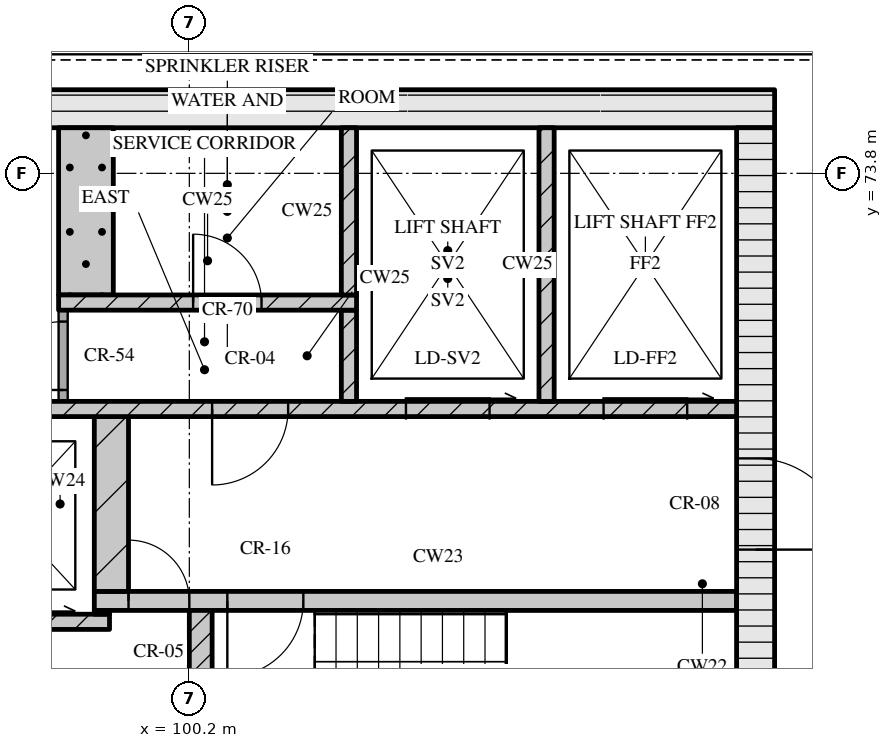
"""IFC4 building model, lengths in metres.
Left out: names, types, materials, properties, quantities, classifications, styles, units other than length and angle.
Written with IfcOpenShell. Run it as: python <this file> out.ifc"""

import sys

from ifc_helpers import new_model, si_unit, direction, frame, frame_2d, origin, place, context, subcontext, project, spatial, rectangle, extrude, element, fill, save


model = new_model("IFC4")
c1 = context("Model", 3, precision=1e-05, world=origin(), true_north=direction((0.0, 1.0)))
c2 = subcontext(c1, "Body", "Model", "MODEL_VIEW")
j1 = project(units=[si_unit("LENGTHUNIT", "METRE"), si_unit("PLANEANGLEUNIT", "RADIAN")], contexts=[c1])
p1 = place(None, origin())
s1 = spatial("IfcSite", under=j1, at=p1, CompositionType="ELEMENT")
p2 = place(p1, origin())
s2 = spatial("IfcBuilding", under=s1, at=p2, CompositionType="ELEMENT")
p3 = place(p2, frame((0.0, 0.0, 285.15)))
s3 = spatial("IfcBuildingStorey", under=s2, at=p3, CompositionType="ELEMENT", Elevation=285.15)
p4 = place(p3, frame((67.3, 74.65, 0.0), z_axis=(0.0, 0.0, 1.0), x_axis=(1.0, 0.0, 0.0)))
e1 = element("IfcWall", 1, at=p4, inside=s3, PredefinedType="SOLIDWALL", context=c2, shape_type="SweptSolid", body=[
    extrude(rectangle(XDim=40.6, YDim=0.5, at=frame_2d((20.3, 0.0))), origin(), (0.0, 0.0, 1.0), 3.32),
])
p5 = place(p3, frame((107.65, 62.4, 0.0), z_axis=(0.0, 0.0, 1.0), x_axis=(0.0, 1.0, 0.0)))
e2 = element("IfcWall", 2, at=p5, inside=s3, PredefinedType="SOLIDWALL", context=c2, shape_type="SweptSolid", body=[
    extrude(rectangle(XDim=12.0, YDim=0.5, at=frame_2d((6.0, 0.0))), origin(), (0.0, 0.0, 1.0), 3.32),
])
p6 = place(p5, frame((6.45, 0.0, 0.0)))
e3 = element("IfcOpeningElement", 3, at=p6, cuts=e2, PredefinedType="OPENING", context=c2, shape_type="SweptSolid", body=[
    extrude(rectangle(XDim=1.2, YDim=2.1, at=frame_2d((0.6, 1.05))), frame((0.0, 0.26, 0.0), z_axis=(0.0, -1.0, 0.0), x_axis=(1.0, 0.0, 0.0)), (0.0, 0.0, 1.0), 0.52),
])
p7 = place(p3, frame((100.35, 65.2, 0.0), z_axis=(0.0, 0.0, 1.0), x_axis=(0.0, 1.0, 0.0)))
e4 = element("IfcWall", 4, at=p7, inside=s3, PredefinedType="SOLIDWALL", context=c2, shape_type="SweptSolid", body=[
    extrude(rectangle(XDim=2.85, YDim=0.3, at=frame_2d((1.425, 0.0))), origin(), (0.0, 0.0, 1.0), 3.32),
])
p8 = place(p3, frame((76.05, 67.9, 0.0), z_axis=(0.0, 0.0, 1.0), x_axis=(1.0, 0.0, 0.0)))
e5 = element("IfcWall", 5, at=p8, inside=s3, PredefinedType="SOLIDWALL", context=c2, shape_type="SweptSolid", body=[
    extrude(rectangle(XDim=23.1, YDim=0.2, at=frame_2d((11.55, 0.0))), origin(), (0.0, 0.0, 1.0), 3.32),
])
p9 = place(p8, frame((0.75, 0.0, 0.0)))
e6 = element("IfcOpeningElement", 6, at=p9, cuts=e5, PredefinedType="OPENING", context=c2, shape_type="SweptSolid", body=[
    extrude(rectangle(XDim=0.9, YDim=2.1, at=frame_2d((0.45, 1.05))), frame((0.0, 0.11, 0.0), z_axis=(0.0, -1.0, 0.0), x_axis=(1.0, 0.0, 0.0)), (0.0, 0.0, 1.0), 0.22),
])
p10 = place(p8, frame((3.32, 0.0, 0.0)))
e7 = element("IfcOpeningElement", 7, at=p10, cuts=e5, PredefinedType="OPENING", context=c2, shape_type="SweptSolid", body=[
    extrude(rectangle(XDim=0.9, YDim=2.1, at=frame_2d((0.45, 1.05))), frame((0.0, 0.11, 0.0), z_axis=(0.0, -1.0, 0.0), x_axis=(1.0, 0.0, 0.0)), (0.0, 0.0, 1.0), 0.22),
])
p11 = place(p8, frame((5.77, 0.0, 0.0)))
e8 = element("IfcOpeningElement", 8, at=p11, cuts=e5, PredefinedType="OPENING", context=c2, shape_type="SweptSolid", body=[
    extrude(rectangle(XDim=0.9, YDim=2.1, at=frame_2d((0.45, 1.05))), frame((0.0, 0.11, 0.0), z_axis=(0.0, -1.0, 0.0), x_axis=(1.0, 0.0, 0.0)), (0.0, 0.0, 1.0), 0.22),
])
p12 = place(p8, frame((8.45, 0.0, 0.0)))
e9 = element("IfcOpeningElement", 9, at=p12, cuts=e5, PredefinedType="OPENING", context=c2, shape_type="SweptSolid", body=[
    extrude(rectangle(XDim=0.9, YDim=2.1, at=frame_2d((0.45, 1.05))), frame((0.0, 0.11, 0.0), z_axis=(0.0, -1.0, 0.0), x_axis=(1.0, 0.0, 0.0)), (0.0, 0.0, 1.0), 0.22),
])
p13 = place(p8, frame((10.91, 0.0, 0.0)))
e10 = element("IfcOpeningElement", 10, at=p13, cuts=e5, PredefinedType="OPENING", context=c2, shape_type="SweptSolid", body=[
    extrude(rectangle(XDim=0.9, YDim=2.1, at=frame_2d((0.45, 1.05))), frame((0.0, 0.11, 0.0), z_axis=(0.0, -1.0, 0.0), x_axis=(1.0, 0.0, 0.0)), (0.0, 0.0, 1.0), 0.22),
])
p14 = place(p8, frame((13.55, 0.0, 0.0)))
e11 = element("IfcOpeningElement", 11, at=p14, cuts=e5, PredefinedType="OPENING", context=c2, shape_type="SweptSolid", body=[
    extrude(rectangle(XDim=1.0, YDim=2.1, at=frame_2d((0.5, 1.05))), frame((0.0, 0.11, 0.0), z_axis=(0.0, -1.0, 0.0), x_axis=(1.0, 0.0, 0.0)), (0.0, 0.0, 1.0), 0.22),
])
p15 = place(p8, frame((16.2, 0.0, 0.0)))
e12 = element("IfcOpeningElement", 12, at=p15, cuts=e5, PredefinedType="OPENING", context=c2, shape_type="SweptSolid", body=[
    extrude(rectangle(XDim=1.1, YDim=2.1, at=frame_2d((0.55, 1.05))), frame((0.0, 0.11, 0.0), z_axis=(0.0, -1.0, 0.0), x_axis=(1.0, 0.0, 0.0)), (0.0, 0.0, 1.0), 0.22),
])
p16 = place(p8, frame((18.7, 0.0, 0.0)))
e13 = element("IfcOpeningElement", 13, at=p16, cuts=e5, PredefinedType="OPENING", context=c2, shape_type="SweptSolid", body=[
    extrude(rectangle(XDim=1.1, YDim=2.1, at=frame_2d((0.55, 1.05))), frame((0.0, 0.11, 0.0), z_axis=(0.0, -1.0, 0.0), x_axis=(1.0, 0.0, 0.0)), (0.0, 0.0, 1.0), 0.22),
])
p17 = place(p8, frame((21.2, 0.0, 0.0)))
e14 = element("IfcOpeningElement", 14, at=p17, cuts=e5, PredefinedType="OPENING", context=c2, shape_type="SweptSolid", body=[
    extrude(rectangle(XDim=1.1, YDim=2.1, at=frame_2d((0.55, 1.05))), frame((0.0, 0.11, 0.0), z_axis=(0.0, -1.0, 0.0), x_axis=(1.0, 0.0, 0.0)), (0.0, 0.0, 1.0), 0.22),
])
p18 = place(p3, frame((98.95, 68.025, 0.0), z_axis=(0.0, 0.0, 1.0), x_axis=(1.0, 0.0, 0.0)))
e15 = element("IfcWall", 15, at=p18, inside=s3, PredefinedType="SOLIDWALL", context=c2, shape_type="SweptSolid", body=[
    extrude(rectangle(XDim=0.2, YDim=0.05, at=frame_2d((0.1, 0.0))), origin(), (0.0, 0.0, 1.0), 3.32),
])
p19 = place(p3, frame((98.95, 68.175, 0.0), z_axis=(0.0, 0.0, 1.0), x_axis=(1.0, 0.0, 0.0)))
e16 = element("IfcWall", 16, at=p19, inside=s3, PredefinedType="SOLIDWALL", context=c2, shape_type="SweptSolid", body=[
    extrude(rectangle(XDim=8.45, YDim=0.25, at=frame_2d((4.225, 0.0))), origin(), (0.0, 0.0, 1.0), 3.32),
])
p20 = place(p19, frame((0.45, 0.0, 0.0)))
e17 = element("IfcOpeningElement", 17, at=p20, cuts=e16, PredefinedType="OPENING", context=c2, shape_type="SweptSolid", body=[
    extrude(rectangle(XDim=0.8, YDim=2.1, at=frame_2d((0.4, 1.05))), frame((0.0, 0.135, 0.0), z_axis=(0.0, -1.0, 0.0), x_axis=(1.0, 0.0, 0.0)), (0.0, 0.0, 1.0), 0.27),
])
p21 = place(p19, frame((1.75, 0.0, 0.0)))
e18 = element("IfcOpeningElement", 18, at=p21, cuts=e16, PredefinedType="OPENING", context=c2, shape_type="SweptSolid", body=[
    extrude(rectangle(XDim=1.0, YDim=2.1, at=frame_2d((0.5, 1.05))), frame((0.0, 0.135, 0.0), z_axis=(0.0, -1.0, 0.0), x_axis=(1.0, 0.0, 0.0)), (0.0, 0.0, 1.0), 0.27),
])
p22 = place(p3, frame((99.175, 68.3, 0.0), z_axis=(0.0, 0.0, 1.0), x_axis=(0.0, 1.0, 0.0)))
e19 = element("IfcWall", 19, at=p22, inside=s3, PredefinedType="SOLIDWALL", context=c2, shape_type="SweptSolid", body=[
    extrude(rectangle(XDim=2.3, YDim=0.45, at=frame_2d((1.15, 0.0))), origin(), (0.0, 0.0, 1.0), 3.32),
])
p23 = place(p3, frame((67.8, 70.7, 0.0), z_axis=(0.0, 0.0, 1.0), x_axis=(1.0, 0.0, 0.0)))
e20 = element("IfcWall", 20, at=p23, inside=s3, PredefinedType="SOLIDWALL", context=c2, shape_type="SweptSolid", body=[
    extrude(rectangle(XDim=39.6, YDim=0.2, at=frame_2d((19.8, 0.0))), origin(), (0.0, 0.0, 1.0), 3.32),
])
p24 = place(p23, frame((0.65, 0.0, 0.0)))
e21 = element("IfcOpeningElement", 21, at=p24, cuts=e20, PredefinedType="OPENING", context=c2, shape_type="SweptSolid", body=[
    extrude(rectangle(XDim=1.1, YDim=2.1, at=frame_2d((0.55, 1.05))), frame((0.0, 0.11, 0.0), z_axis=(0.0, -1.0, 0.0), x_axis=(1.0, 0.0, 0.0)), (0.0, 0.0, 1.0), 0.22),
])
p25 = place(p23, frame((3.25, 0.0, 0.0)))
e22 = element("IfcOpeningElement", 22, at=p25, cuts=e20, PredefinedType="OPENING", context=c2, shape_type="SweptSolid", body=[
    extrude(rectangle(XDim=1.1, YDim=2.1, at=frame_2d((0.55, 1.05))), frame((0.0, 0.11, 0.0), z_axis=(0.0, -1.0, 0.0), x_axis=(1.0, 0.0, 0.0)), (0.0, 0.0, 1.0), 0.22),
])
p26 = place(p23, frame((5.9, 0.0, 0.0)))
e23 = element("IfcOpeningElement", 23, at=p26, cuts=e20, PredefinedType="OPENING", context=c2, shape_type="SweptSolid", body=[
    extrude(rectangle(XDim=1.0, YDim=2.1, at=frame_2d((0.5, 1.05))), frame((0.0, 0.11, 0.0), z_axis=(0.0, -1.0, 0.0), x_axis=(1.0, 0.0, 0.0)), (0.0, 0.0, 1.0), 0.22),
])
p27 = place(p23, frame((21.7, 0.0, 0.0)))
e24 = element("IfcOpeningElement", 24, at=p27, cuts=e20, PredefinedType="OPENING", context=c2, shape_type="SweptSolid", body=[
    extrude(rectangle(XDim=1.0, YDim=2.1, at=frame_2d((0.5, 1.05))), frame((0.0, 0.11, 0.0), z_axis=(0.0, -1.0, 0.0), x_axis=(1.0, 0.0, 0.0)), (0.0, 0.0, 1.0), 0.22),
])
p28 = place(p23, frame((32.7, 0.0, 0.0)))
e25 = element("IfcOpeningElement", 25, at=p28, cuts=e20, PredefinedType="OPENING", context=c2, shape_type="SweptSolid", body=[
    extrude(rectangle(XDim=1.0, YDim=2.1, at=frame_2d((0.5, 1.05))), frame((0.0, 0.11, 0.0), z_axis=(0.0, -1.0, 0.0), x_axis=(1.0, 0.0, 0.0)), (0.0, 0.0, 1.0), 0.22),
])
p29 = place(p23, frame((35.25, 0.0, 0.0)))
e26 = element("IfcOpeningElement", 26, at=p29, cuts=e20, PredefinedType="OPENING", context=c2, shape_type="SweptSolid", body=[
    extrude(rectangle(XDim=1.1, YDim=2.1, at=frame_2d((0.55, 1.05))), frame((0.0, 0.11, 0.0), z_axis=(0.0, -1.0, 0.0), x_axis=(1.0, 0.0, 0.0)), (0.0, 0.0, 1.0), 0.22),
])
p30 = place(p23, frame((37.85, 0.0, 0.0)))
e27 = element("IfcOpeningElement", 27, at=p30, cuts=e20, PredefinedType="OPENING", context=c2, shape_type="SweptSolid", body=[
    extrude(rectangle(XDim=1.1, YDim=2.1, at=frame_2d((0.55, 1.05))), frame((0.0, 0.11, 0.0), z_axis=(0.0, -1.0, 0.0), x_axis=(1.0, 0.0, 0.0)), (0.0, 0.0, 1.0), 0.22),
])
p31 = place(p3, frame((98.54, 70.8, 0.0), z_axis=(0.0, 0.0, 1.0), x_axis=(0.0, 1.0, 0.0)))
e28 = element("IfcWall", 28, at=p31, inside=s3, PredefinedType="PARTITIONING", context=c2, shape_type="SweptSolid", body=[
    extrude(rectangle(XDim=1.2, YDim=0.12, at=frame_2d((0.6, 0.0))), origin(), (0.0, 0.0, 1.0), 3.32),
])
p32 = place(p31, frame((0.15, 0.0, 0.0)))
e29 = element("IfcOpeningElement", 29, at=p32, cuts=e28, PredefinedType="OPENING", context=c2, shape_type="SweptSolid", body=[
    extrude(rectangle(XDim=0.9, YDim=2.1, at=frame_2d((0.45, 1.05))), frame((0.0, 0.07, 0.0), z_axis=(0.0, -1.0, 0.0), x_axis=(1.0, 0.0, 0.0)), (0.0, 0.0, 1.0), 0.14),
])
p33 = place(p3, frame((102.3, 70.8, 0.0), z_axis=(0.0, 0.0, 1.0), x_axis=(0.0, 1.0, 0.0)))
e30 = element("IfcWall", 30, at=p33, inside=s3, PredefinedType="SOLIDWALL", context=c2, shape_type="SweptSolid", body=[
    extrude(rectangle(XDim=1.2, YDim=0.2, at=frame_2d((0.6, 0.0))), origin(), (0.0, 0.0, 1.0), 3.32),
])
p34 = place(p3, frame((104.9, 70.8, 0.0), z_axis=(0.0, 0.0, 1.0), x_axis=(0.0, 1.0, 0.0)))
e31 = element("IfcWall", 31, at=p34, inside=s3, PredefinedType="SOLIDWALL", context=c2, shape_type="SweptSolid", body=[
    extrude(rectangle(XDim=3.6, YDim=0.2, at=frame_2d((1.8, 0.0))), origin(), (0.0, 0.0, 1.0), 3.32),
])
p35 = place(p3, frame((98.48, 72.1, 0.0), z_axis=(0.0, 0.0, 1.0), x_axis=(1.0, 0.0, 0.0)))
e32 = element("IfcWall", 32, at=p35, inside=s3, PredefinedType="SOLIDWALL", context=c2, shape_type="SweptSolid", body=[
    extrude(rectangle(XDim=3.92, YDim=0.2, at=frame_2d((1.96, 0.0))), origin(), (0.0, 0.0, 1.0), 3.32),
])
p36 = place(p35, frame((1.77, 0.0, 0.0)))
e33 = element("IfcOpeningElement", 33, at=p36, cuts=e32, PredefinedType="OPENING", context=c2, shape_type="SweptSolid", body=[
    extrude(rectangle(XDim=0.9, YDim=2.1, at=frame_2d((0.45, 1.05))), frame((0.0, 0.11, 0.0), z_axis=(0.0, -1.0, 0.0), x_axis=(1.0, 0.0, 0.0)), (0.0, 0.0, 1.0), 0.22),
])
p37 = place(p3, frame((98.84, 72.2, 0.0), z_axis=(0.0, 0.0, 1.0), x_axis=(0.0, 1.0, 0.0)))
e34 = element("IfcWall", 34, at=p37, inside=s3, PredefinedType="SOLIDWALL", context=c2, shape_type="SweptSolid", body=[
    extrude(rectangle(XDim=2.2, YDim=0.72, at=frame_2d((1.1, 0.0))), origin(), (0.0, 0.0, 1.0), 3.32),
])
p38 = place(p3, frame((102.3, 72.2, 0.0), z_axis=(0.0, 0.0, 1.0), x_axis=(0.0, 1.0, 0.0)))
e35 = element("IfcWall", 35, at=p38, inside=s3, PredefinedType="SOLIDWALL", context=c2, shape_type="SweptSolid", body=[
    extrude(rectangle(XDim=2.2, YDim=0.2, at=frame_2d((1.1, 0.0))), origin(), (0.0, 0.0, 1.0), 3.32),
])
p39 = place(p20, origin())
e36 = element("IfcDoor", 36, at=p39, inside=s3, OperationType="SINGLE_SWING_LEFT", PredefinedType="DOOR", context=c2, shape_type="SweptSolid", body=[
    extrude(rectangle(XDim=0.8, YDim=2.1, at=frame_2d((0.4, 1.05))), frame((0.0, 0.025, 0.0), z_axis=(0.0, -1.0, 0.0), x_axis=(1.0, 0.0, 0.0)), (0.0, 0.0, 1.0), 0.05),
])
fill(e17, e36)
p40 = place(p21, origin())
e37 = element("IfcDoor", 37, at=p40, inside=s3, OperationType="SINGLE_SWING_RIGHT", PredefinedType="DOOR", context=c2, shape_type="SweptSolid", body=[
    extrude(rectangle(XDim=1.0, YDim=2.1, at=frame_2d((0.5, 1.05))), frame((0.0, 0.025, 0.0), z_axis=(0.0, -1.0, 0.0), x_axis=(1.0, 0.0, 0.0)), (0.0, 0.0, 1.0), 0.05),
])
fill(e18, e37)
p41 = place(p6, origin())
e38 = element("IfcDoor", 38, at=p41, inside=s3, OperationType="SINGLE_SWING_RIGHT", PredefinedType="DOOR", context=c2, shape_type="SweptSolid", body=[
    extrude(rectangle(XDim=1.2, YDim=2.1, at=frame_2d((0.6, 1.05))), frame((0.0, 0.025, 0.0), z_axis=(0.0, -1.0, 0.0), x_axis=(1.0, 0.0, 0.0)), (0.0, 0.0, 1.0), 0.05),
])
fill(e3, e38)
p42 = place(p28, origin())
e39 = element("IfcDoor", 39, at=p42, inside=s3, OperationType="SINGLE_SWING_RIGHT", PredefinedType="DOOR", context=c2, shape_type="SweptSolid", body=[
    extrude(rectangle(XDim=1.0, YDim=2.1, at=frame_2d((0.5, 1.05))), frame((0.0, 0.025, 0.0), z_axis=(0.0, -1.0, 0.0), x_axis=(1.0, 0.0, 0.0)), (0.0, 0.0, 1.0), 0.05),
])
fill(e25, e39)
p43 = place(p29, origin())
e40 = element("IfcDoor", 40, at=p43, inside=s3, OperationType="SLIDING_TO_RIGHT", PredefinedType="DOOR", context=c2, shape_type="SweptSolid", body=[
    extrude(rectangle(XDim=1.1, YDim=2.1, at=frame_2d((0.55, 1.05))), frame((0.0, 0.025, 0.0), z_axis=(0.0, -1.0, 0.0), x_axis=(1.0, 0.0, 0.0)), (0.0, 0.0, 1.0), 0.05),
])
fill(e26, e40)
p44 = place(p30, origin())
e41 = element("IfcDoor", 41, at=p44, inside=s3, OperationType="SLIDING_TO_RIGHT", PredefinedType="DOOR", context=c2, shape_type="SweptSolid", body=[
    extrude(rectangle(XDim=1.1, YDim=2.1, at=frame_2d((0.55, 1.05))), frame((0.0, 0.025, 0.0), z_axis=(0.0, -1.0, 0.0), x_axis=(1.0, 0.0, 0.0)), (0.0, 0.0, 1.0), 0.05),
])
fill(e27, e41)
p45 = place(p32, origin())
e42 = element("IfcDoor", 42, at=p45, inside=s3, OperationType="SINGLE_SWING_LEFT", PredefinedType="DOOR", context=c2, shape_type="SweptSolid", body=[
    extrude(rectangle(XDim=0.9, YDim=2.1, at=frame_2d((0.45, 1.05))), frame((0.0, 0.025, 0.0), z_axis=(0.0, -1.0, 0.0), x_axis=(1.0, 0.0, 0.0)), (0.0, 0.0, 1.0), 0.05),
])
fill(e29, e42)
p46 = place(p36, origin())
e43 = element("IfcDoor", 43, at=p46, inside=s3, OperationType="SINGLE_SWING_LEFT", PredefinedType="DOOR", context=c2, shape_type="SweptSolid", body=[
    extrude(rectangle(XDim=0.9, YDim=2.1, at=frame_2d((0.45, 1.05))), frame((0.0, 0.025, 0.0), z_axis=(0.0, -1.0, 0.0), x_axis=(1.0, 0.0, 0.0)), (0.0, 0.0, 1.0), 0.05),
])
fill(e33, e43)
save(model, sys.argv[1])
